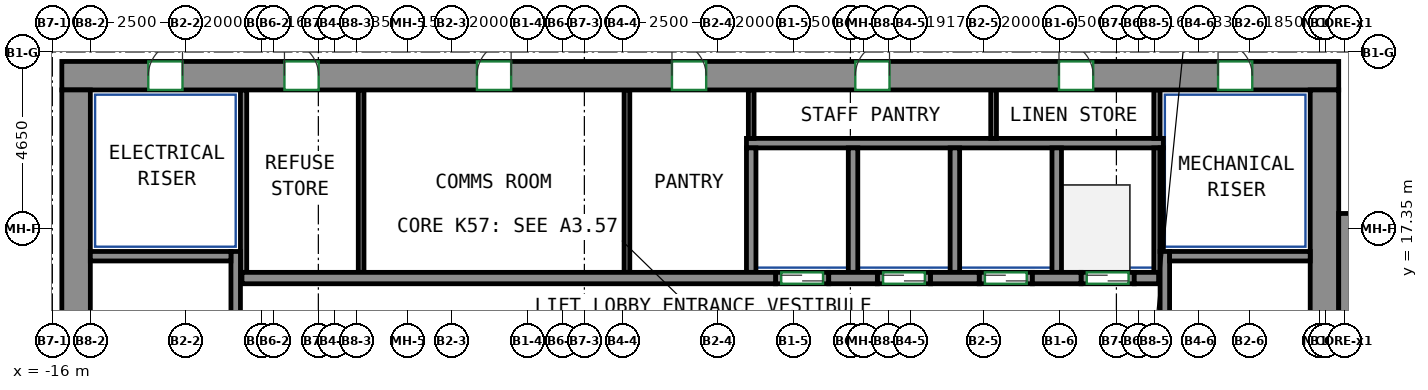
"""IFC4 building model, lengths in metres.
Left out: names, types, materials, properties, quantities, classifications, styles, units other than length and angle.
Written with IfcOpenShell. Run it as: python <this file> out.ifc"""

import sys

from ifc_helpers import new_model, si_unit, direction, frame, frame_2d, origin, place, context, subcontext, project, spatial, rectangle, extrude, source, transform, mapped, element, fill, save


model = new_model("IFC4")
c1 = context("Model", 3, precision=1e-05, world=origin(), true_north=direction((0.0, 1.0)))
c2 = subcontext(c1, "Body", "Model", "MODEL_VIEW")
j1 = project(units=[si_unit("LENGTHUNIT", "METRE"), si_unit("PLANEANGLEUNIT", "RADIAN")], contexts=[c1])
p1 = place(None, origin())
s1 = spatial("IfcSite", under=j1, at=p1, CompositionType="ELEMENT")
p2 = place(p1, origin())
s2 = spatial("IfcBuilding", under=s1, at=p2, CompositionType="ELEMENT")
p3 = place(p2, frame((0.0, 0.0, 233.6)))
s3 = spatial("IfcBuildingStorey", under=s2, at=p3, CompositionType="ELEMENT", Elevation=233.6)
m1 = source(origin(), c2, "Body", "SweptSolid", [
    extrude(rectangle(XDim=33.6, YDim=0.75, at=frame_2d((16.8, 0.0))), origin(), (0.0, 0.0, 1.0), 5.12),
])
p4 = place(p3, frame((-15.75, 21.375, 0.0), z_axis=(0.0, 0.0, 1.0), x_axis=(1.0, 0.0, 0.0)))
e1 = element("IfcWall", 1, at=p4, inside=s3, PredefinedType="SHEAR", context=c2, shape_type="MappedRepresentation", body=[
    mapped(m1, transform((0.0, 0.0, 0.0))),
])
p5 = place(p4, frame((5.858, 0.0, 0.0)))
e2 = element("IfcOpeningElement", 2, at=p5, cuts=e1, PredefinedType="OPENING", context=c2, shape_type="SweptSolid", body=[
    extrude(rectangle(XDim=0.9, YDim=2.1, at=frame_2d((0.45, 1.05))), frame((0.0, 0.385, 0.0), z_axis=(0.0, -1.0, 0.0), x_axis=(1.0, 0.0, 0.0)), (0.0, 0.0, 1.0), 0.77),
])
p6 = place(p4, frame((10.923, 0.0, 0.0)))
e3 = element("IfcOpeningElement", 3, at=p6, cuts=e1, PredefinedType="OPENING", context=c2, shape_type="SweptSolid", body=[
    extrude(rectangle(XDim=0.9, YDim=2.1, at=frame_2d((0.45, 1.05))), frame((0.0, 0.385, 0.0), z_axis=(0.0, -1.0, 0.0), x_axis=(1.0, 0.0, 0.0)), (0.0, 0.0, 1.0), 0.77),
])
p7 = place(p4, frame((16.055, 0.0, 0.0)))
e4 = element("IfcOpeningElement", 4, at=p7, cuts=e1, PredefinedType="OPENING", context=c2, shape_type="SweptSolid", body=[
    extrude(rectangle(XDim=0.9, YDim=2.1, at=frame_2d((0.45, 1.05))), frame((0.0, 0.385, 0.0), z_axis=(0.0, -1.0, 0.0), x_axis=(1.0, 0.0, 0.0)), (0.0, 0.0, 1.0), 0.77),
])
p8 = place(p4, frame((20.879, 0.0, 0.0)))
e5 = element("IfcOpeningElement", 5, at=p8, cuts=e1, PredefinedType="OPENING", context=c2, shape_type="SweptSolid", body=[
    extrude(rectangle(XDim=0.9, YDim=2.1, at=frame_2d((0.45, 1.05))), frame((0.0, 0.385, 0.0), z_axis=(0.0, -1.0, 0.0), x_axis=(1.0, 0.0, 0.0)), (0.0, 0.0, 1.0), 0.77),
])
p9 = place(p4, frame((26.239, 0.0, 0.0)))
e6 = element("IfcOpeningElement", 6, at=p9, cuts=e1, PredefinedType="OPENING", context=c2, shape_type="SweptSolid", body=[
    extrude(rectangle(XDim=0.9, YDim=2.1, at=frame_2d((0.45, 1.05))), frame((0.0, 0.385, 0.0), z_axis=(0.0, -1.0, 0.0), x_axis=(1.0, 0.0, 0.0)), (0.0, 0.0, 1.0), 0.77),
])
p10 = place(p4, frame((2.275, 0.0, 0.0)))
e7 = element("IfcOpeningElement", 7, at=p10, cuts=e1, PredefinedType="OPENING", context=c2, shape_type="SweptSolid", body=[
    extrude(rectangle(XDim=0.9, YDim=2.1, at=frame_2d((0.45, 1.05))), frame((0.0, 0.385, 0.0), z_axis=(0.0, -1.0, 0.0), x_axis=(1.0, 0.0, 0.0)), (0.0, 0.0, 1.0), 0.77),
])
p11 = place(p4, frame((30.425, 0.0, 0.0)))
e8 = element("IfcOpeningElement", 8, at=p11, cuts=e1, PredefinedType="OPENING", context=c2, shape_type="SweptSolid", body=[
    extrude(rectangle(XDim=0.9, YDim=2.1, at=frame_2d((0.45, 1.05))), frame((0.0, 0.385, 0.0), z_axis=(0.0, -1.0, 0.0), x_axis=(1.0, 0.0, 0.0)), (0.0, 0.0, 1.0), 0.77),
])
m2 = source(origin(), c2, "Body", "SweptSolid", [
    extrude(rectangle(XDim=12.0, YDim=0.75, at=frame_2d((6.0, 0.0))), origin(), (0.0, 0.0, 1.0), 5.12),
])
for number, where, z_axis, x_axis in (
    (9, (-15.375, 9.0, 0.0), (0.0, 0.0, 1.0), (0.0, 1.0, 0.0)),
    (10, (17.475, 9.0, 0.0), (0.0, 0.0, 1.0), (0.0, 1.0, 0.0)),
):
    element("IfcWall", number, at=place(p3, frame(where, z_axis=z_axis, x_axis=x_axis)), inside=s3, PredefinedType="SHEAR", context=c2, shape_type="MappedRepresentation", body=[
        mapped(m2, transform((0.0, 0.0, 0.0))),
    ])
m3 = source(origin(), c2, "Body", "SweptSolid", [
    extrude(rectangle(XDim=7.75, YDim=0.25, at=frame_2d((3.875, 0.0))), origin(), (0.0, 0.0, 1.0), 5.12),
])
p12 = place(p3, frame((-11.175, 9.0, 0.0), z_axis=(0.0, 0.0, 1.0), x_axis=(0.0, 1.0, 0.0)))
e11 = element("IfcWall", 11, at=p12, inside=s3, PredefinedType="SHEAR", context=c2, shape_type="MappedRepresentation", body=[
    mapped(m3, transform((0.0, 0.0, 0.0))),
])
m4 = source(origin(), c2, "Body", "SweptSolid", [
    extrude(rectangle(XDim=3.7, YDim=0.25, at=frame_2d((1.85, 0.0))), origin(), (0.0, 0.0, 1.0), 5.12),
])
p13 = place(p3, frame((-15.0, 16.625, 0.0), z_axis=(0.0, 0.0, 1.0), x_axis=(1.0, 0.0, 0.0)))
e12 = element("IfcWall", 12, at=p13, inside=s3, PredefinedType="SHEAR", context=c2, shape_type="MappedRepresentation", body=[
    mapped(m4, transform((0.0, 0.0, 0.0))),
])
p14 = place(p3, frame((13.275, 9.0, 0.0), z_axis=(0.0, 0.0, 1.0), x_axis=(0.0, 1.0, 0.0)))
e13 = element("IfcWall", 13, at=p14, inside=s3, PredefinedType="SHEAR", context=c2, shape_type="MappedRepresentation", body=[
    mapped(m3, transform((0.0, 0.0, 0.0))),
])
m5 = source(origin(), c2, "Body", "SweptSolid", [
    extrude(rectangle(XDim=3.7, YDim=0.25, at=frame_2d((1.85, 0.0))), origin(), (0.0, 0.0, 1.0), 5.12),
])
p15 = place(p3, frame((13.4, 16.625, 0.0), z_axis=(0.0, 0.0, 1.0), x_axis=(1.0, 0.0, 0.0)))
e14 = element("IfcWall", 14, at=p15, inside=s3, PredefinedType="SHEAR", context=c2, shape_type="MappedRepresentation", body=[
    mapped(m5, transform((0.0, 0.0, 0.0))),
])
m6 = source(origin(), c2, "Body", "SweptSolid", [
    extrude(rectangle(XDim=8.0, YDim=0.5, at=frame_2d((4.0, 0.0))), origin(), (0.0, 0.0, 1.0), 5.12),
])
p16 = place(p3, frame((18.1, 9.75, 0.0), z_axis=(0.0, 0.0, 1.0), x_axis=(0.0, 1.0, 0.0)))
e15 = element("IfcWall", 15, at=p16, inside=s3, PredefinedType="SHEAR", context=c2, shape_type="MappedRepresentation", body=[
    mapped(m6, transform((0.0, 0.0, 0.0))),
])
m7 = source(origin(), c2, "Body", "SweptSolid", [
    extrude(rectangle(XDim=14.04, YDim=0.3, at=frame_2d((7.02, 0.0))), origin(), (0.0, 0.0, 1.0), 5.12),
])
p17 = place(p3, frame((-11.01, 16.05, 0.0), z_axis=(0.0, 0.0, 1.0), x_axis=(1.0, 0.0, 0.0)))
e16 = element("IfcWall", 16, at=p17, inside=s3, PredefinedType="SHEAR", context=c2, shape_type="MappedRepresentation", body=[
    mapped(m7, transform((0.0, 0.0, 0.0))),
])
m8 = source(origin(), c2, "Body", "SweptSolid", [
    extrude(rectangle(XDim=1.28, YDim=0.3, at=frame_2d((0.64, 0.0))), origin(), (0.0, 0.0, 1.0), 5.12),
])
p18 = place(p3, frame((4.43, 16.05, 0.0), z_axis=(0.0, 0.0, 1.0), x_axis=(1.0, 0.0, 0.0)))
e17 = element("IfcWall", 17, at=p18, inside=s3, PredefinedType="SHEAR", context=c2, shape_type="MappedRepresentation", body=[
    mapped(m8, transform((0.0, 0.0, 0.0))),
])
m9 = source(origin(), c2, "Body", "SweptSolid", [
    extrude(rectangle(XDim=1.28, YDim=0.3, at=frame_2d((0.64, 0.0))), origin(), (0.0, 0.0, 1.0), 5.12),
])
p19 = place(p3, frame((7.11, 16.05, 0.0), z_axis=(0.0, 0.0, 1.0), x_axis=(1.0, 0.0, 0.0)))
e18 = element("IfcWall", 18, at=p19, inside=s3, PredefinedType="SHEAR", context=c2, shape_type="MappedRepresentation", body=[
    mapped(m9, transform((0.0, 0.0, 0.0))),
])
p20 = place(p3, frame((9.79, 16.05, 0.0), z_axis=(0.0, 0.0, 1.0), x_axis=(1.0, 0.0, 0.0)))
e19 = element("IfcWall", 19, at=p20, inside=s3, PredefinedType="SHEAR", context=c2, shape_type="MappedRepresentation", body=[
    mapped(m8, transform((0.0, 0.0, 0.0))),
])
m10 = source(origin(), c2, "Body", "SweptSolid", [
    extrude(rectangle(XDim=0.64, YDim=0.3, at=frame_2d((0.32, 0.0))), origin(), (0.0, 0.0, 1.0), 5.12),
])
p21 = place(p3, frame((12.47, 16.05, 0.0), z_axis=(0.0, 0.0, 1.0), x_axis=(1.0, 0.0, 0.0)))
e20 = element("IfcWall", 20, at=p21, inside=s3, PredefinedType="SHEAR", context=c2, shape_type="MappedRepresentation", body=[
    mapped(m10, transform((0.0, 0.0, 0.0))),
])
m11 = source(origin(), c2, "Body", "SweptSolid", [
    extrude(rectangle(XDim=1.4, YDim=0.3, at=frame_2d((0.7, 0.0))), origin(), (0.0, 0.0, 1.0), 5.12),
])
p22 = place(p3, frame((11.07, 16.05, 0.0), z_axis=(0.0, 0.0, 1.0), x_axis=(1.0, 0.0, 0.0)))
e21 = element("IfcWall", 21, at=p22, inside=s3, PredefinedType="PARTITIONING", context=c2, shape_type="MappedRepresentation", body=[
    mapped(m11, transform((0.0, 0.0, 0.0))),
])
p23 = place(p22, frame((0.15, 0.0, 0.0)))
e22 = element("IfcOpeningElement", 22, at=p23, cuts=e21, PredefinedType="OPENING", context=c2, shape_type="SweptSolid", body=[
    extrude(rectangle(XDim=1.1, YDim=2.1, at=frame_2d((0.55, 1.05))), frame((0.0, 0.16, 0.0), z_axis=(0.0, -1.0, 0.0), x_axis=(1.0, 0.0, 0.0)), (0.0, 0.0, 1.0), 0.32),
])
p24 = place(p3, frame((3.03, 16.05, 0.0), z_axis=(0.0, 0.0, 1.0), x_axis=(1.0, 0.0, 0.0)))
e23 = element("IfcWall", 23, at=p24, inside=s3, PredefinedType="PARTITIONING", context=c2, shape_type="MappedRepresentation", body=[
    mapped(m11, transform((0.0, 0.0, 0.0))),
])
p25 = place(p24, frame((0.15, 0.0, 0.0)))
e24 = element("IfcOpeningElement", 24, at=p25, cuts=e23, PredefinedType="OPENING", context=c2, shape_type="SweptSolid", body=[
    extrude(rectangle(XDim=1.1, YDim=2.1, at=frame_2d((0.55, 1.05))), frame((0.0, 0.16, 0.0), z_axis=(0.0, -1.0, 0.0), x_axis=(1.0, 0.0, 0.0)), (0.0, 0.0, 1.0), 0.32),
])
m12 = source(origin(), c2, "Body", "SweptSolid", [
    extrude(rectangle(XDim=1.4, YDim=0.3, at=frame_2d((0.7, 0.0))), origin(), (0.0, 0.0, 1.0), 5.12),
])
p26 = place(p3, frame((5.71, 16.05, 0.0), z_axis=(0.0, 0.0, 1.0), x_axis=(1.0, 0.0, 0.0)))
e25 = element("IfcWall", 25, at=p26, inside=s3, PredefinedType="PARTITIONING", context=c2, shape_type="MappedRepresentation", body=[
    mapped(m12, transform((0.0, 0.0, 0.0))),
])
p27 = place(p26, frame((0.15, 0.0, 0.0)))
e26 = element("IfcOpeningElement", 26, at=p27, cuts=e25, PredefinedType="OPENING", context=c2, shape_type="SweptSolid", body=[
    extrude(rectangle(XDim=1.1, YDim=2.1, at=frame_2d((0.55, 1.05))), frame((0.0, 0.16, 0.0), z_axis=(0.0, -1.0, 0.0), x_axis=(1.0, 0.0, 0.0)), (0.0, 0.0, 1.0), 0.32),
])
p28 = place(p3, frame((8.39, 16.05, 0.0), z_axis=(0.0, 0.0, 1.0), x_axis=(1.0, 0.0, 0.0)))
e27 = element("IfcWall", 27, at=p28, inside=s3, PredefinedType="PARTITIONING", context=c2, shape_type="MappedRepresentation", body=[
    mapped(m12, transform((0.0, 0.0, 0.0))),
])
p29 = place(p28, frame((0.15, 0.0, 0.0)))
e28 = element("IfcOpeningElement", 28, at=p29, cuts=e27, PredefinedType="OPENING", context=c2, shape_type="SweptSolid", body=[
    extrude(rectangle(XDim=1.1, YDim=2.1, at=frame_2d((0.55, 1.05))), frame((0.0, 0.16, 0.0), z_axis=(0.0, -1.0, 0.0), x_axis=(1.0, 0.0, 0.0)), (0.0, 0.0, 1.0), 0.32),
])
m13 = source(origin(), c2, "Body", "SweptSolid", [
    extrude(rectangle(XDim=10.97, YDim=0.25, at=frame_2d((5.485, 0.0))), origin(), (0.0, 0.0, 1.0), 5.12),
])
p30 = place(p3, frame((2.265, 19.6, 0.0), z_axis=(0.0, 0.0, 1.0), x_axis=(1.0, 0.0, 0.0)))
e29 = element("IfcWall", 29, at=p30, inside=s3, PredefinedType="PARTITIONING", context=c2, shape_type="MappedRepresentation", body=[
    mapped(m13, transform((0.0, 0.0, 0.0))),
])
m14 = source(origin(), c2, "Body", "SweptSolid", [
    extrude(rectangle(XDim=3.275, YDim=0.165, at=frame_2d((1.638, 0.0))), origin(), (0.0, 0.0, 1.0), 5.12),
])
p31 = place(p3, frame((13.067, 16.2, 0.0), z_axis=(0.0, 0.0, 1.0), x_axis=(0.0, 1.0, 0.0)))
e30 = element("IfcWall", 30, at=p31, inside=s3, PredefinedType="PARTITIONING", context=c2, shape_type="MappedRepresentation", body=[
    mapped(m14, transform((0.0, 0.0, 0.0))),
])
m15 = source(origin(), c2, "Body", "SweptSolid", [
    extrude(rectangle(XDim=1.275, YDim=0.165, at=frame_2d((0.637, 0.0))), origin(), (0.0, 0.0, 1.0), 5.12),
])
p32 = place(p3, frame((13.067, 19.725, 0.0), z_axis=(0.0, 0.0, 1.0), x_axis=(0.0, 1.0, 0.0)))
e31 = element("IfcWall", 31, at=p32, inside=s3, PredefinedType="PARTITIONING", context=c2, shape_type="MappedRepresentation", body=[
    mapped(m15, transform((0.0, 0.0, 0.0))),
])
m16 = source(origin(), c2, "Body", "SweptSolid", [
    extrude(rectangle(XDim=4.8, YDim=0.165, at=frame_2d((2.4, 0.0))), origin(), (0.0, 0.0, 1.0), 5.12),
])
p33 = place(p3, frame((-10.968, 16.2, 0.0), z_axis=(0.0, 0.0, 1.0), x_axis=(0.0, 1.0, 0.0)))
e32 = element("IfcWall", 32, at=p33, inside=s3, PredefinedType="PARTITIONING", context=c2, shape_type="MappedRepresentation", body=[
    mapped(m16, transform((0.0, 0.0, 0.0))),
])
m17 = source(origin(), c2, "Body", "SweptSolid", [
    extrude(rectangle(XDim=3.275, YDim=0.25, at=frame_2d((1.638, 0.0))), origin(), (0.0, 0.0, 1.0), 5.12),
])
p34 = place(p3, frame((10.43, 16.2, 0.0), z_axis=(0.0, 0.0, 1.0), x_axis=(0.0, 1.0, 0.0)))
e33 = element("IfcWall", 33, at=p34, inside=s3, PredefinedType="PARTITIONING", context=c2, shape_type="MappedRepresentation", body=[
    mapped(m17, transform((0.0, 0.0, 0.0))),
])
m18 = source(origin(), c2, "Body", "SweptSolid", [
    extrude(rectangle(XDim=2.725, YDim=0.085, at=frame_2d((1.363, 0.0))), origin(), (0.0, 0.0, 1.0), 5.12),
])
p35 = place(p3, frame((13.192, 16.75, 0.0), z_axis=(0.0, 0.0, 1.0), x_axis=(0.0, 1.0, 0.0)))
e34 = element("IfcWall", 34, at=p35, inside=s3, PredefinedType="PARTITIONING", context=c2, shape_type="MappedRepresentation", body=[
    mapped(m18, transform((0.0, 0.0, 0.0))),
])
for number, where, z_axis, x_axis in (
    (35, (2.39, 16.2, 0.0), (0.0, 0.0, 1.0), (0.0, 1.0, 0.0)),
    (36, (5.07, 16.2, 0.0), (0.0, 0.0, 1.0), (0.0, 1.0, 0.0)),
    (37, (7.75, 16.2, 0.0), (0.0, 0.0, 1.0), (0.0, 1.0, 0.0)),
):
    element("IfcWall", number, at=place(p3, frame(where, z_axis=z_axis, x_axis=x_axis)), inside=s3, PredefinedType="PARTITIONING", context=c2, shape_type="MappedRepresentation", body=[
        mapped(m17, transform((0.0, 0.0, 0.0))),
    ])
m19 = source(origin(), c2, "Body", "SweptSolid", [
    extrude(rectangle(XDim=4.8, YDim=0.15, at=frame_2d((2.4, 0.0))), origin(), (0.0, 0.0, 1.0), 5.12),
])
for number, where, z_axis, x_axis in (
    (38, (-7.875, 16.2, 0.0), (0.0, 0.0, 1.0), (0.0, 1.0, 0.0)),
    (39, (-0.88, 16.2, 0.0), (0.0, 0.0, 1.0), (0.0, 1.0, 0.0)),
):
    element("IfcWall", number, at=place(p3, frame(where, z_axis=z_axis, x_axis=x_axis)), inside=s3, PredefinedType="PARTITIONING", context=c2, shape_type="MappedRepresentation", body=[
        mapped(m19, transform((0.0, 0.0, 0.0))),
    ])
m20 = source(origin(), c2, "Body", "SweptSolid", [
    extrude(rectangle(XDim=1.275, YDim=0.15, at=frame_2d((0.637, 0.0))), origin(), (0.0, 0.0, 1.0), 5.12),
])
for number, where, z_axis, x_axis in (
    (40, (2.39, 19.725, 0.0), (0.0, 0.0, 1.0), (0.0, 1.0, 0.0)),
    (41, (8.768, 19.725, 0.0), (0.0, 0.0, 1.0), (0.0, 1.0, 0.0)),
):
    element("IfcWall", number, at=place(p3, frame(where, z_axis=z_axis, x_axis=x_axis)), inside=s3, PredefinedType="PARTITIONING", context=c2, shape_type="MappedRepresentation", body=[
        mapped(m20, transform((0.0, 0.0, 0.0))),
    ])
p36 = place(p23, origin())
e42 = element("IfcDoor", 42, at=p36, inside=s3, OperationType="DOUBLE_DOOR_SLIDING", PredefinedType="DOOR", context=c2, shape_type="SweptSolid", body=[
    extrude(rectangle(XDim=1.1, YDim=2.1, at=frame_2d((0.55, 1.05))), frame((0.0, 0.025, 0.0), z_axis=(0.0, -1.0, 0.0), x_axis=(1.0, 0.0, 0.0)), (0.0, 0.0, 1.0), 0.05),
])
fill(e22, e42)
p37 = place(p25, origin())
e43 = element("IfcDoor", 43, at=p37, inside=s3, OperationType="DOUBLE_DOOR_SLIDING", PredefinedType="DOOR", context=c2, shape_type="SweptSolid", body=[
    extrude(rectangle(XDim=1.1, YDim=2.1, at=frame_2d((0.55, 1.05))), frame((0.0, 0.025, 0.0), z_axis=(0.0, -1.0, 0.0), x_axis=(1.0, 0.0, 0.0)), (0.0, 0.0, 1.0), 0.05),
])
fill(e24, e43)
p38 = place(p27, origin())
e44 = element("IfcDoor", 44, at=p38, inside=s3, OperationType="DOUBLE_DOOR_SLIDING", PredefinedType="DOOR", context=c2, shape_type="SweptSolid", body=[
    extrude(rectangle(XDim=1.1, YDim=2.1, at=frame_2d((0.55, 1.05))), frame((0.0, 0.025, 0.0), z_axis=(0.0, -1.0, 0.0), x_axis=(1.0, 0.0, 0.0)), (0.0, 0.0, 1.0), 0.05),
])
fill(e26, e44)
p39 = place(p29, origin())
e45 = element("IfcDoor", 45, at=p39, inside=s3, OperationType="DOUBLE_DOOR_SLIDING", PredefinedType="DOOR", context=c2, shape_type="SweptSolid", body=[
    extrude(rectangle(XDim=1.1, YDim=2.1, at=frame_2d((0.55, 1.05))), frame((0.0, 0.025, 0.0), z_axis=(0.0, -1.0, 0.0), x_axis=(1.0, 0.0, 0.0)), (0.0, 0.0, 1.0), 0.05),
])
fill(e28, e45)
p40 = place(p5, origin())
e46 = element("IfcDoor", 46, at=p40, inside=s3, OperationType="SINGLE_SWING_LEFT", PredefinedType="DOOR", context=c2, shape_type="SweptSolid", body=[
    extrude(rectangle(XDim=0.9, YDim=2.1, at=frame_2d((0.45, 1.05))), frame((0.0, -0.23, 0.0), z_axis=(0.0, -1.0, 0.0), x_axis=(1.0, 0.0, 0.0)), (0.0, 0.0, 1.0), 0.05),
])
fill(e2, e46)
p41 = place(p6, origin())
e47 = element("IfcDoor", 47, at=p41, inside=s3, OperationType="SINGLE_SWING_RIGHT", PredefinedType="DOOR", context=c2, shape_type="SweptSolid", body=[
    extrude(rectangle(XDim=0.9, YDim=2.1, at=frame_2d((0.45, 1.05))), frame((0.0, -0.23, 0.0), z_axis=(0.0, -1.0, 0.0), x_axis=(1.0, 0.0, 0.0)), (0.0, 0.0, 1.0), 0.05),
])
fill(e3, e47)
p42 = place(p7, origin())
e48 = element("IfcDoor", 48, at=p42, inside=s3, OperationType="SINGLE_SWING_LEFT", PredefinedType="DOOR", context=c2, shape_type="SweptSolid", body=[
    extrude(rectangle(XDim=0.9, YDim=2.1, at=frame_2d((0.45, 1.05))), frame((0.0, -0.23, 0.0), z_axis=(0.0, -1.0, 0.0), x_axis=(1.0, 0.0, 0.0)), (0.0, 0.0, 1.0), 0.05),
])
fill(e4, e48)
p43 = place(p8, origin())
e49 = element("IfcDoor", 49, at=p43, inside=s3, OperationType="SINGLE_SWING_RIGHT", PredefinedType="DOOR", context=c2, shape_type="SweptSolid", body=[
    extrude(rectangle(XDim=0.9, YDim=2.1, at=frame_2d((0.45, 1.05))), frame((0.0, -0.23, 0.0), z_axis=(0.0, -1.0, 0.0), x_axis=(1.0, 0.0, 0.0)), (0.0, 0.0, 1.0), 0.05),
])
fill(e5, e49)
p44 = place(p9, origin())
e50 = element("IfcDoor", 50, at=p44, inside=s3, OperationType="SINGLE_SWING_LEFT", PredefinedType="DOOR", context=c2, shape_type="SweptSolid", body=[
    extrude(rectangle(XDim=0.9, YDim=2.1, at=frame_2d((0.45, 1.05))), frame((0.0, -0.23, 0.0), z_axis=(0.0, -1.0, 0.0), x_axis=(1.0, 0.0, 0.0)), (0.0, 0.0, 1.0), 0.05),
])
fill(e6, e50)
p45 = place(p10, origin())
e51 = element("IfcDoor", 51, at=p45, inside=s3, OperationType="SINGLE_SWING_RIGHT", PredefinedType="DOOR", context=c2, shape_type="SweptSolid", body=[
    extrude(rectangle(XDim=0.9, YDim=2.1, at=frame_2d((0.45, 1.05))), frame((0.0, -0.23, 0.0), z_axis=(0.0, -1.0, 0.0), x_axis=(1.0, 0.0, 0.0)), (0.0, 0.0, 1.0), 0.05),
])
fill(e7, e51)
p46 = place(p11, origin())
e52 = element("IfcDoor", 52, at=p46, inside=s3, OperationType="SINGLE_SWING_LEFT", PredefinedType="DOOR", context=c2, shape_type="SweptSolid", body=[
    extrude(rectangle(XDim=0.9, YDim=2.1, at=frame_2d((0.45, 1.05))), frame((0.0, -0.23, 0.0), z_axis=(0.0, -1.0, 0.0), x_axis=(1.0, 0.0, 0.0)), (0.0, 0.0, 1.0), 0.05),
])
fill(e8, e52)
save(model, sys.argv[1])
